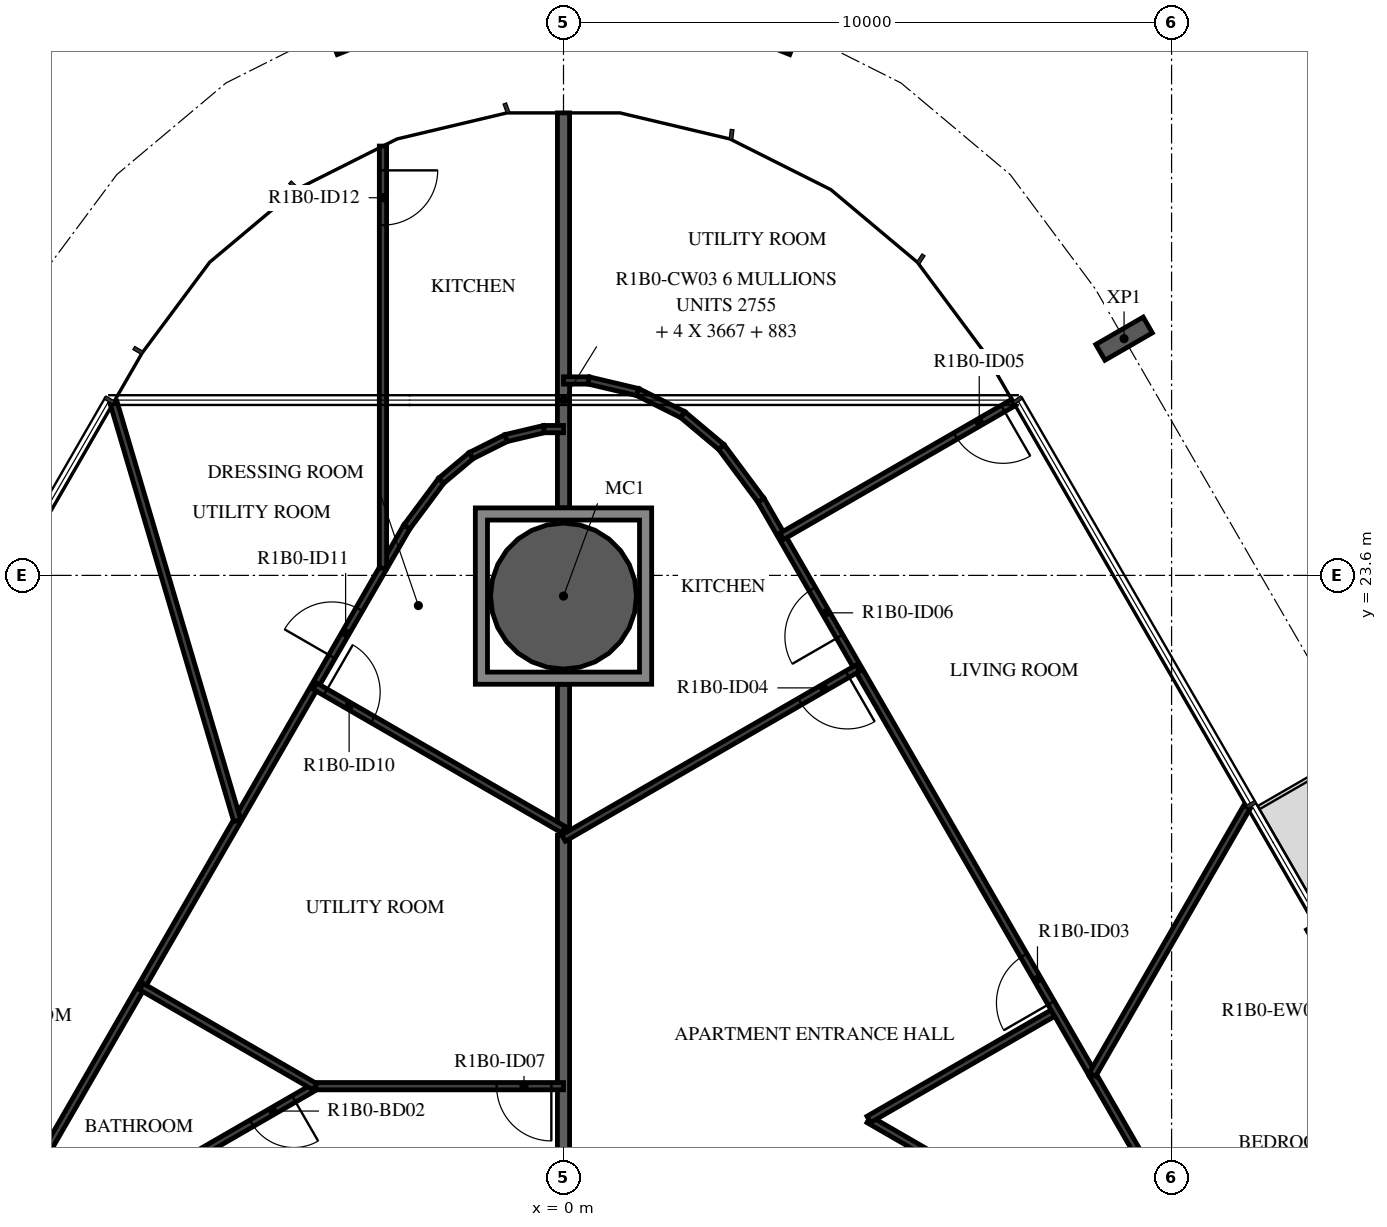
"""IFC4 building model, lengths in metres.
Left out: names, types, materials, properties, quantities, classifications, styles, units other than length and angle.
Written with IfcOpenShell. Run it as: python <this file> out.ifc"""

import sys

from ifc_helpers import new_model, si_unit, direction, frame, frame_2d, origin, origin_2d, place, context, subcontext, project, spatial, polyline, rectangle, hollow_circle, i_section, outline, extrude, element, fill, save


model = new_model("IFC4")
c1 = context("Model", 3, precision=1e-05, world=origin(), true_north=direction((0.0, 1.0)))
c2 = subcontext(c1, "Body", "Model", "MODEL_VIEW")
j1 = project(units=[si_unit("LENGTHUNIT", "METRE"), si_unit("PLANEANGLEUNIT", "RADIAN")], contexts=[c1])
p1 = place(None, origin())
s1 = spatial("IfcSite", under=j1, at=p1, CompositionType="ELEMENT")
p2 = place(p1, origin())
s2 = spatial("IfcBuilding", under=s1, at=p2, CompositionType="ELEMENT")
p3 = place(p2, frame((0.0, 0.0, 52.4)))
s3 = spatial("IfcBuildingStorey", under=s2, at=p3, CompositionType="ELEMENT", Elevation=52.4)
p4 = place(p3, frame((0.0, 23.26, -0.38), z_axis=(0.0, 0.0, 1.0), x_axis=(1.0, 0.0, 0.0)))
e1 = element("IfcColumn", 1, at=p4, inside=s3, PredefinedType="COLUMN", context=c2, shape_type="SweptSolid", body=[
    extrude(hollow_circle(Radius=1.2, WallThickness=0.06, at=origin_2d()), origin(), (0.0, 0.0, 1.0), 3.5),
])
for number, where, z_axis, x_axis in (
    (2, (9.219, 27.493, -0.38), (0.0, 0.0, 1.0), (0.5, -0.866, 0.0)),
    (3, (3.748, 32.639, -0.38), (0.0, 0.0, 1.0), (0.929, -0.371, 0.0)),
    (4, (-3.748, 32.639, -0.38), (0.0, 0.0, 1.0), (0.929, 0.371, 0.0)),
):
    element("IfcColumn", number, at=place(p3, frame(where, z_axis=z_axis, x_axis=x_axis)), inside=s3, PredefinedType="COLUMN", context=c2, shape_type="SweptSolid", body=[
        extrude(i_section(OverallWidth=0.3, OverallDepth=0.9, WebThickness=0.019, FlangeThickness=0.035, FilletRadius=0.03, at=origin_2d()), origin(), (0.0, 0.0, 1.0), 3.5),
    ])
p5 = place(p3, frame((13.891, 15.041, 0.0), z_axis=(0.0, 0.0, 1.0), x_axis=(-0.499971222258, 0.866042017984, 0.0)))
e5 = element("IfcWall", 5, at=p5, inside=s3, PredefinedType="STANDARD", context=c2, shape_type="SweptSolid", body=[
    extrude(rectangle(XDim=3.2, YDim=0.16, at=frame_2d((1.6, 0.0))), origin(), (0.0, 0.0, 1.0), 3.12),
])
p6 = place(p5, frame((0.4, 0.0, 0.0)))
e6 = element("IfcOpeningElement", 6, at=p6, cuts=e5, PredefinedType="OPENING", context=c2, shape_type="SweptSolid", body=[
    extrude(rectangle(XDim=2.4, YDim=2.4, at=frame_2d((1.2, 1.2))), frame((0.0, 0.09, 0.0), z_axis=(0.0, -1.0, 0.0), x_axis=(1.0, 0.0, 0.0)), (0.0, 0.0, 1.0), 0.18),
])
p7 = place(p3, frame((0.0, 19.326, 0.0), z_axis=(0.0, 0.0, 1.0), x_axis=(0.0, -1.0, 0.0)))
e7 = element("IfcWall", 7, at=p7, inside=s3, PredefinedType="STANDARD", context=c2, shape_type="SweptSolid", body=[
    extrude(rectangle(XDim=5.626, YDim=0.2, at=frame_2d((2.813, 0.0))), origin(), (0.0, 0.0, 1.0), 3.12),
])
p8 = place(p3, frame((0.0, 31.206, 0.0), z_axis=(0.0, 0.0, 1.0), x_axis=(0.0, -1.0, 0.0)))
e8 = element("IfcWall", 8, at=p8, inside=s3, PredefinedType="STANDARD", context=c2, shape_type="SweptSolid", body=[
    extrude(rectangle(XDim=6.496, YDim=0.2, at=frame_2d((3.248, 0.0))), origin(), (0.0, 0.0, 1.0), 3.12),
])
p9 = place(p3, frame((0.0, 21.81, 0.0), z_axis=(0.0, 0.0, 1.0), x_axis=(0.0, -1.0, 0.0)))
e9 = element("IfcWall", 9, at=p9, inside=s3, PredefinedType="STANDARD", context=c2, shape_type="SweptSolid", body=[
    extrude(rectangle(XDim=2.392, YDim=0.2, at=frame_2d((1.196, 0.0))), origin(), (0.0, 0.0, 1.0), 3.12),
])
p10 = place(p3, frame((11.127, 11.127, 0.0), z_axis=(0.0, 0.0, 1.0), x_axis=(-0.86602299963, 0.500004164094, 0.0)))
e10 = element("IfcWall", 10, at=p10, inside=s3, PredefinedType="PARTITIONING", context=c2, shape_type="SweptSolid", body=[
    extrude(rectangle(XDim=7.052, YDim=0.12, at=frame_2d((3.526, 0.0))), origin(), (0.0, 0.0, 1.0), 3.12),
])
p11 = place(p10, frame((1.4, 0.0, 0.0)))
e11 = element("IfcOpeningElement", 11, at=p11, cuts=e10, PredefinedType="OPENING", context=c2, shape_type="SweptSolid", body=[
    extrude(rectangle(XDim=0.8, YDim=2.1, at=frame_2d((0.4, 1.05))), frame((0.0, 0.07, 0.0), z_axis=(0.0, -1.0, 0.0), x_axis=(1.0, 0.0, 0.0)), (0.0, 0.0, 1.0), 0.14),
])
p12 = place(p3, frame((5.02, 14.653, 0.0), z_axis=(0.0, 0.0, 1.0), x_axis=(0.866028940167, 0.499993874756, 0.0)))
e12 = element("IfcWall", 12, at=p12, inside=s3, PredefinedType="PARTITIONING", context=c2, shape_type="SweptSolid", body=[
    extrude(rectangle(XDim=3.556, YDim=0.12, at=frame_2d((1.778, 0.0))), origin(), (0.0, 0.0, 1.0), 3.12),
])
p13 = place(p3, frame((8.7, 15.392, 0.0), z_axis=(0.0, 0.0, 1.0), x_axis=(-0.500002742713, 0.866023820272, 0.0)))
e13 = element("IfcWall", 13, at=p13, inside=s3, PredefinedType="PARTITIONING", context=c2, shape_type="SweptSolid", body=[
    extrude(rectangle(XDim=10.908, YDim=0.12, at=frame_2d((5.454, 0.0))), origin(), (0.0, 0.0, 1.0), 3.12),
])
p14 = place(p13, frame((1.36, 0.0, 0.0)))
e14 = element("IfcOpeningElement", 14, at=p14, cuts=e13, PredefinedType="OPENING", context=c2, shape_type="SweptSolid", body=[
    extrude(rectangle(XDim=0.9, YDim=2.1, at=frame_2d((0.45, 1.05))), frame((0.0, 0.07, 0.0), z_axis=(0.0, -1.0, 0.0), x_axis=(1.0, 0.0, 0.0)), (0.0, 0.0, 1.0), 0.14),
])
p15 = place(p13, frame((8.317, 0.0, 0.0)))
e15 = element("IfcOpeningElement", 15, at=p15, cuts=e13, PredefinedType="OPENING", context=c2, shape_type="SweptSolid", body=[
    extrude(rectangle(XDim=0.9, YDim=2.1, at=frame_2d((0.45, 1.05))), frame((0.0, 0.07, 0.0), z_axis=(0.0, -1.0, 0.0), x_axis=(1.0, 0.0, 0.0)), (0.0, 0.0, 1.0), 0.14),
])
p16 = place(p3, frame((4.841, 22.075, 0.0), z_axis=(0.0, 0.0, 1.0), x_axis=(-0.866019751484, -0.500009789943, 0.0)))
e16 = element("IfcWall", 16, at=p16, inside=s3, PredefinedType="PARTITIONING", context=c2, shape_type="SweptSolid", body=[
    extrude(rectangle(XDim=5.59, YDim=0.12, at=frame_2d((2.795, 0.0))), origin(), (0.0, 0.0, 1.0), 3.12),
])
p17 = place(p16, frame((0.2, 0.0, 0.0)))
e17 = element("IfcOpeningElement", 17, at=p17, cuts=e16, PredefinedType="OPENING", context=c2, shape_type="SweptSolid", body=[
    extrude(rectangle(XDim=0.9, YDim=2.1, at=frame_2d((0.45, 1.05))), frame((0.0, 0.07, 0.0), z_axis=(0.0, -1.0, 0.0), x_axis=(1.0, 0.0, 0.0)), (0.0, 0.0, 1.0), 0.14),
])
p18 = place(p3, frame((8.7, 15.392, 0.0), z_axis=(0.0, 0.0, 1.0), x_axis=(0.499986106925, -0.866033424806, 0.0)))
e18 = element("IfcWall", 18, at=p18, inside=s3, PredefinedType="PARTITIONING", context=c2, shape_type="SweptSolid", body=[
    extrude(rectangle(XDim=5.317, YDim=0.12, at=frame_2d((2.659, 0.0))), origin(), (0.0, 0.0, 1.0), 3.12),
])
p19 = place(p3, frame((11.24, 19.792, 0.0), z_axis=(0.0, 0.0, 1.0), x_axis=(-0.499978956711, -0.866037552792, 0.0)))
e19 = element("IfcWall", 19, at=p19, inside=s3, PredefinedType="PARTITIONING", context=c2, shape_type="SweptSolid", body=[
    extrude(rectangle(XDim=5.081, YDim=0.12, at=frame_2d((2.541, 0.0))), origin(), (0.0, 0.0, 1.0), 3.12),
])
p20 = place(p3, frame((7.4, 26.443, 0.0), z_axis=(0.0, 0.0, 1.0), x_axis=(-0.866032203192, -0.499988222896, 0.0)))
e20 = element("IfcWall", 20, at=p20, inside=s3, PredefinedType="PARTITIONING", context=c2, shape_type="SweptSolid", body=[
    extrude(rectangle(XDim=4.4, YDim=0.12, at=frame_2d((2.2, 0.0))), origin(), (0.0, 0.0, 1.0), 2.73),
])
p21 = place(p20, frame((0.2, 0.0, 0.0)))
e21 = element("IfcOpeningElement", 21, at=p21, cuts=e20, PredefinedType="OPENING", context=c2, shape_type="SweptSolid", body=[
    extrude(rectangle(XDim=0.9, YDim=2.1, at=frame_2d((0.45, 1.05))), frame((0.0, 0.07, 0.0), z_axis=(0.0, -1.0, 0.0), x_axis=(1.0, 0.0, 0.0)), (0.0, 0.0, 1.0), 0.14),
])
p22 = place(p3, frame((0.0, 26.806, 0.0), z_axis=(0.0, 0.0, 1.0), x_axis=(1.0, 0.0, 0.0)))
e22 = element("IfcWall", 22, at=p22, inside=s3, PredefinedType="PARTITIONING", context=c2, shape_type="SweptSolid", body=[
    extrude(rectangle(XDim=0.415, YDim=0.12, at=frame_2d((0.207, 0.0))), origin(), (0.0, 0.0, 1.0), 3.12),
])
p23 = place(p3, frame((0.415, 26.806, 0.0), z_axis=(0.0, 0.0, 1.0), x_axis=(0.973048993259, -0.230598475097, 0.0)))
e23 = element("IfcWall", 23, at=p23, inside=s3, PredefinedType="PARTITIONING", context=c2, shape_type="SweptSolid", body=[
    extrude(rectangle(XDim=0.829, YDim=0.12, at=frame_2d((0.415, 0.0))), origin(), (0.0, 0.0, 1.0), 3.12),
])
for number, where, z_axis, x_axis in (
    (24, (1.221, 26.615, 0.0), (0.0, 0.0, 1.0), (0.894, -0.449, 0.0)),
    (25, (1.962, 26.243, 0.0), (0.0, 0.0, 1.0), (0.766, -0.643, 0.0)),
):
    element("IfcWall", number, at=place(p3, frame(where, z_axis=z_axis, x_axis=x_axis)), inside=s3, PredefinedType="PARTITIONING", context=c2, shape_type="SweptSolid", body=[
        extrude(rectangle(XDim=0.829, YDim=0.12, at=frame_2d((0.415, 0.0))), origin(), (0.0, 0.0, 1.0), 3.12),
    ])
p24 = place(p3, frame((2.597, 25.71, 0.0), z_axis=(0.0, 0.0, 1.0), x_axis=(0.59722925597, -0.802070580319, 0.0)))
e26 = element("IfcWall", 26, at=p24, inside=s3, PredefinedType="PARTITIONING", context=c2, shape_type="SweptSolid", body=[
    extrude(rectangle(XDim=1.087, YDim=0.12, at=frame_2d((0.543, 0.0))), origin(), (0.0, 0.0, 1.0), 3.12),
])
p25 = place(p3, frame((0.0, 15.2, 0.0), z_axis=(0.0, 0.0, 1.0), x_axis=(-1.0, 0.0, 0.0)))
e27 = element("IfcWall", 27, at=p25, inside=s3, PredefinedType="PARTITIONING", context=c2, shape_type="SweptSolid", body=[
    extrude(rectangle(XDim=4.073, YDim=0.12, at=frame_2d((2.036, 0.0))), origin(), (0.0, 0.0, 1.0), 3.12),
])
p26 = place(p25, frame((0.2, 0.0, 0.0)))
e28 = element("IfcOpeningElement", 28, at=p26, cuts=e27, PredefinedType="OPENING", context=c2, shape_type="SweptSolid", body=[
    extrude(rectangle(XDim=0.9, YDim=2.1, at=frame_2d((0.45, 1.05))), frame((0.0, 0.07, 0.0), z_axis=(0.0, -1.0, 0.0), x_axis=(1.0, 0.0, 0.0)), (0.0, 0.0, 1.0), 0.14),
])
p27 = place(p3, frame((-4.088, 15.191, 0.0), z_axis=(0.0, 0.0, 1.0), x_axis=(-0.866024500911, -0.50000156382, 0.0)))
e29 = element("IfcWall", 29, at=p27, inside=s3, PredefinedType="PARTITIONING", context=c2, shape_type="SweptSolid", body=[
    extrude(rectangle(XDim=6.587, YDim=0.12, at=frame_2d((3.294, 0.0))), origin(), (0.0, 0.0, 1.0), 3.12),
])
p28 = place(p27, frame((0.4, 0.0, 0.0)))
e30 = element("IfcOpeningElement", 30, at=p28, cuts=e29, PredefinedType="OPENING", context=c2, shape_type="SweptSolid", body=[
    extrude(rectangle(XDim=0.8, YDim=2.1, at=frame_2d((0.4, 1.05))), frame((0.0, 0.07, 0.0), z_axis=(0.0, -1.0, 0.0), x_axis=(1.0, 0.0, 0.0)), (0.0, 0.0, 1.0), 0.14),
])
p29 = place(p3, frame((-9.793, 11.897, 0.0), z_axis=(0.0, 0.0, 1.0), x_axis=(0.499981117606, 0.866036305265, 0.0)))
e31 = element("IfcWall", 31, at=p29, inside=s3, PredefinedType="PARTITIONING", context=c2, shape_type="SweptSolid", body=[
    extrude(rectangle(XDim=14.434, YDim=0.12, at=frame_2d((7.217, 0.0))), origin(), (0.0, 0.0, 1.0), 3.12),
])
p30 = place(p29, frame((11.97, 0.0, 0.0)))
e32 = element("IfcOpeningElement", 32, at=p30, cuts=e31, PredefinedType="OPENING", context=c2, shape_type="SweptSolid", body=[
    extrude(rectangle(XDim=0.9, YDim=2.1, at=frame_2d((0.45, 1.05))), frame((0.0, 0.07, 0.0), z_axis=(0.0, -1.0, 0.0), x_axis=(1.0, 0.0, 0.0)), (0.0, 0.0, 1.0), 0.14),
])
p31 = place(p3, frame((-2.576, 24.398, 0.0), z_axis=(0.0, 0.0, 1.0), x_axis=(0.597273205282, 0.802037853379, 0.0)))
e33 = element("IfcWall", 33, at=p31, inside=s3, PredefinedType="PARTITIONING", context=c2, shape_type="SweptSolid", body=[
    extrude(rectangle(XDim=0.947, YDim=0.12, at=frame_2d((0.473, 0.0))), origin(), (0.0, 0.0, 1.0), 3.12),
])
p32 = place(p3, frame((-2.011, 25.157, 0.0), z_axis=(0.0, 0.0, 1.0), x_axis=(0.76603445255, 0.642799515795, 0.0)))
e34 = element("IfcWall", 34, at=p32, inside=s3, PredefinedType="PARTITIONING", context=c2, shape_type="SweptSolid", body=[
    extrude(rectangle(XDim=0.642, YDim=0.12, at=frame_2d((0.321, 0.0))), origin(), (0.0, 0.0, 1.0), 3.12),
])
p33 = place(p3, frame((-1.519, 25.57, 0.0), z_axis=(0.0, 0.0, 1.0), x_axis=(0.893665331281, 0.448734081239, 0.0)))
e35 = element("IfcWall", 35, at=p33, inside=s3, PredefinedType="PARTITIONING", context=c2, shape_type="SweptSolid", body=[
    extrude(rectangle(XDim=0.642, YDim=0.12, at=frame_2d((0.321, 0.0))), origin(), (0.0, 0.0, 1.0), 3.12),
])
p34 = place(p3, frame((-0.946, 25.858, 0.0), z_axis=(0.0, 0.0, 1.0), x_axis=(0.973066815876, 0.230523256615, 0.0)))
e36 = element("IfcWall", 36, at=p34, inside=s3, PredefinedType="PARTITIONING", context=c2, shape_type="SweptSolid", body=[
    extrude(rectangle(XDim=0.642, YDim=0.12, at=frame_2d((0.321, 0.0))), origin(), (0.0, 0.0, 1.0), 3.12),
])
p35 = place(p3, frame((-0.321, 26.006, 0.0), z_axis=(0.0, 0.0, 1.0), x_axis=(1.0, 0.0, 0.0)))
e37 = element("IfcWall", 37, at=p35, inside=s3, PredefinedType="PARTITIONING", context=c2, shape_type="SweptSolid", body=[
    extrude(rectangle(XDim=0.321, YDim=0.12, at=frame_2d((0.161, 0.0))), origin(), (0.0, 0.0, 1.0), 3.12),
])
p36 = place(p3, frame((-2.969, 30.66, 0.0), z_axis=(0.0, 0.0, 1.0), x_axis=(0.0, -1.0, 0.0)))
e38 = element("IfcWall", 38, at=p36, inside=s3, PredefinedType="PARTITIONING", context=c2, shape_type="SweptSolid", body=[
    extrude(rectangle(XDim=6.943, YDim=0.12, at=frame_2d((3.471, 0.0))), origin(), (0.0, 0.0, 1.0), 3.12),
])
p37 = place(p36, frame((0.4, 0.0, 0.0)))
e39 = element("IfcOpeningElement", 39, at=p37, cuts=e38, PredefinedType="OPENING", context=c2, shape_type="SweptSolid", body=[
    extrude(rectangle(XDim=0.9, YDim=2.1, at=frame_2d((0.45, 1.05))), frame((0.0, 0.07, 0.0), z_axis=(0.0, -1.0, 0.0), x_axis=(1.0, 0.0, 0.0)), (0.0, 0.0, 1.0), 0.14),
])
p38 = place(p3, frame((-4.088, 21.779, 0.0), z_axis=(0.0, 0.0, 1.0), x_axis=(0.866032292145, -0.49998806882, 0.0)))
e40 = element("IfcWall", 40, at=p38, inside=s3, PredefinedType="PARTITIONING", context=c2, shape_type="SweptSolid", body=[
    extrude(rectangle(XDim=4.721, YDim=0.12, at=frame_2d((2.36, 0.0))), origin(), (0.0, 0.0, 1.0), 3.12),
])
p39 = place(p38, frame((0.2, 0.0, 0.0)))
e41 = element("IfcOpeningElement", 41, at=p39, cuts=e40, PredefinedType="OPENING", context=c2, shape_type="SweptSolid", body=[
    extrude(rectangle(XDim=0.9, YDim=2.1, at=frame_2d((0.45, 1.05))), frame((0.0, 0.07, 0.0), z_axis=(0.0, -1.0, 0.0), x_axis=(1.0, 0.0, 0.0)), (0.0, 0.0, 1.0), 0.14),
])
p40 = place(p3, frame((-6.941, 16.838, 0.0), z_axis=(0.0, 0.0, 1.0), x_axis=(0.866017718408, -0.500013311227, 0.0)))
e42 = element("IfcWall", 42, at=p40, inside=s3, PredefinedType="PARTITIONING", context=c2, shape_type="SweptSolid", body=[
    extrude(rectangle(XDim=3.294, YDim=0.12, at=frame_2d((1.647, 0.0))), origin(), (0.0, 0.0, 1.0), 3.12),
])
p41 = place(p3, frame((-7.4, 26.443, 0.0), z_axis=(0.0, 0.0, 1.0), x_axis=(0.283756762476, -0.958896292489, 0.0)))
e43 = element("IfcWall", 43, at=p41, inside=s3, PredefinedType="PARTITIONING", context=c2, shape_type="SweptSolid", body=[
    extrude(rectangle(XDim=7.17, YDim=0.12, at=frame_2d((3.585, 0.0))), origin(), (0.0, 0.0, 1.0), 3.12),
])
p42 = place(p3, origin())
e44 = element("IfcWall", 44, at=p42, inside=s3, PredefinedType="STANDARD", context=c2, shape_type="SweptSolid", body=[
    extrude(outline(polyline([(1.45, 24.71), (1.45, 21.81), (-1.45, 21.81), (-1.45, 24.71), (1.45, 24.71)]), holes=[polyline([(-1.25, 22.01), (1.25, 22.01), (1.25, 24.51), (-1.25, 24.51), (-1.25, 22.01)])]), origin(), (0.0, 0.0, 1.0), 3.12),
])
p43 = place(p14, origin())
e45 = element("IfcDoor", 45, at=p43, inside=s3, OperationType="SINGLE_SWING_RIGHT", PredefinedType="DOOR", context=c2, shape_type="SweptSolid", body=[
    extrude(rectangle(XDim=0.9, YDim=2.1, at=frame_2d((0.45, 1.05))), frame((0.0, 0.025, 0.0), z_axis=(0.0, -1.0, 0.0), x_axis=(1.0, 0.0, 0.0)), (0.0, 0.0, 1.0), 0.05),
])
fill(e14, e45)
p44 = place(p17, origin())
e46 = element("IfcDoor", 46, at=p44, inside=s3, OperationType="SINGLE_SWING_RIGHT", PredefinedType="DOOR", context=c2, shape_type="SweptSolid", body=[
    extrude(rectangle(XDim=0.9, YDim=2.1, at=frame_2d((0.45, 1.05))), frame((0.0, 0.025, 0.0), z_axis=(0.0, -1.0, 0.0), x_axis=(1.0, 0.0, 0.0)), (0.0, 0.0, 1.0), 0.05),
])
fill(e17, e46)
p45 = place(p21, origin())
e47 = element("IfcDoor", 47, at=p45, inside=s3, OperationType="SINGLE_SWING_RIGHT", PredefinedType="DOOR", context=c2, shape_type="SweptSolid", body=[
    extrude(rectangle(XDim=0.9, YDim=2.1, at=frame_2d((0.45, 1.05))), frame((0.0, 0.025, 0.0), z_axis=(0.0, -1.0, 0.0), x_axis=(1.0, 0.0, 0.0)), (0.0, 0.0, 1.0), 0.05),
])
fill(e21, e47)
p46 = place(p15, origin())
e48 = element("IfcDoor", 48, at=p46, inside=s3, OperationType="SINGLE_SWING_LEFT", PredefinedType="DOOR", context=c2, shape_type="SweptSolid", body=[
    extrude(rectangle(XDim=0.9, YDim=2.1, at=frame_2d((0.45, 1.05))), frame((0.0, 0.025, 0.0), z_axis=(0.0, -1.0, 0.0), x_axis=(1.0, 0.0, 0.0)), (0.0, 0.0, 1.0), 0.05),
])
fill(e15, e48)
p47 = place(p26, origin())
e49 = element("IfcDoor", 49, at=p47, inside=s3, OperationType="SINGLE_SWING_RIGHT", PredefinedType="DOOR", context=c2, shape_type="SweptSolid", body=[
    extrude(rectangle(XDim=0.9, YDim=2.1, at=frame_2d((0.45, 1.05))), frame((0.0, 0.025, 0.0), z_axis=(0.0, -1.0, 0.0), x_axis=(1.0, 0.0, 0.0)), (0.0, 0.0, 1.0), 0.05),
])
fill(e28, e49)
p48 = place(p28, origin())
e50 = element("IfcDoor", 50, at=p48, inside=s3, OperationType="SINGLE_SWING_LEFT", PredefinedType="DOOR", context=c2, shape_type="SweptSolid", body=[
    extrude(rectangle(XDim=0.8, YDim=2.1, at=frame_2d((0.4, 1.05))), frame((0.0, 0.025, 0.0), z_axis=(0.0, -1.0, 0.0), x_axis=(1.0, 0.0, 0.0)), (0.0, 0.0, 1.0), 0.05),
])
fill(e30, e50)
p49 = place(p39, origin())
e51 = element("IfcDoor", 51, at=p49, inside=s3, OperationType="SINGLE_SWING_LEFT", PredefinedType="DOOR", context=c2, shape_type="SweptSolid", body=[
    extrude(rectangle(XDim=0.9, YDim=2.1, at=frame_2d((0.45, 1.05))), frame((0.0, 0.025, 0.0), z_axis=(0.0, -1.0, 0.0), x_axis=(1.0, 0.0, 0.0)), (0.0, 0.0, 1.0), 0.05),
])
fill(e41, e51)
p50 = place(p30, origin())
e52 = element("IfcDoor", 52, at=p50, inside=s3, OperationType="SINGLE_SWING_LEFT", PredefinedType="DOOR", context=c2, shape_type="SweptSolid", body=[
    extrude(rectangle(XDim=0.9, YDim=2.1, at=frame_2d((0.45, 1.05))), frame((0.0, 0.025, 0.0), z_axis=(0.0, -1.0, 0.0), x_axis=(1.0, 0.0, 0.0)), (0.0, 0.0, 1.0), 0.05),
])
fill(e32, e52)
p51 = place(p37, origin())
e53 = element("IfcDoor", 53, at=p51, inside=s3, OperationType="SINGLE_SWING_LEFT", PredefinedType="DOOR", context=c2, shape_type="SweptSolid", body=[
    extrude(rectangle(XDim=0.9, YDim=2.1, at=frame_2d((0.45, 1.05))), frame((0.0, 0.025, 0.0), z_axis=(0.0, -1.0, 0.0), x_axis=(1.0, 0.0, 0.0)), (0.0, 0.0, 1.0), 0.05),
])
fill(e39, e53)
save(model, sys.argv[1])
